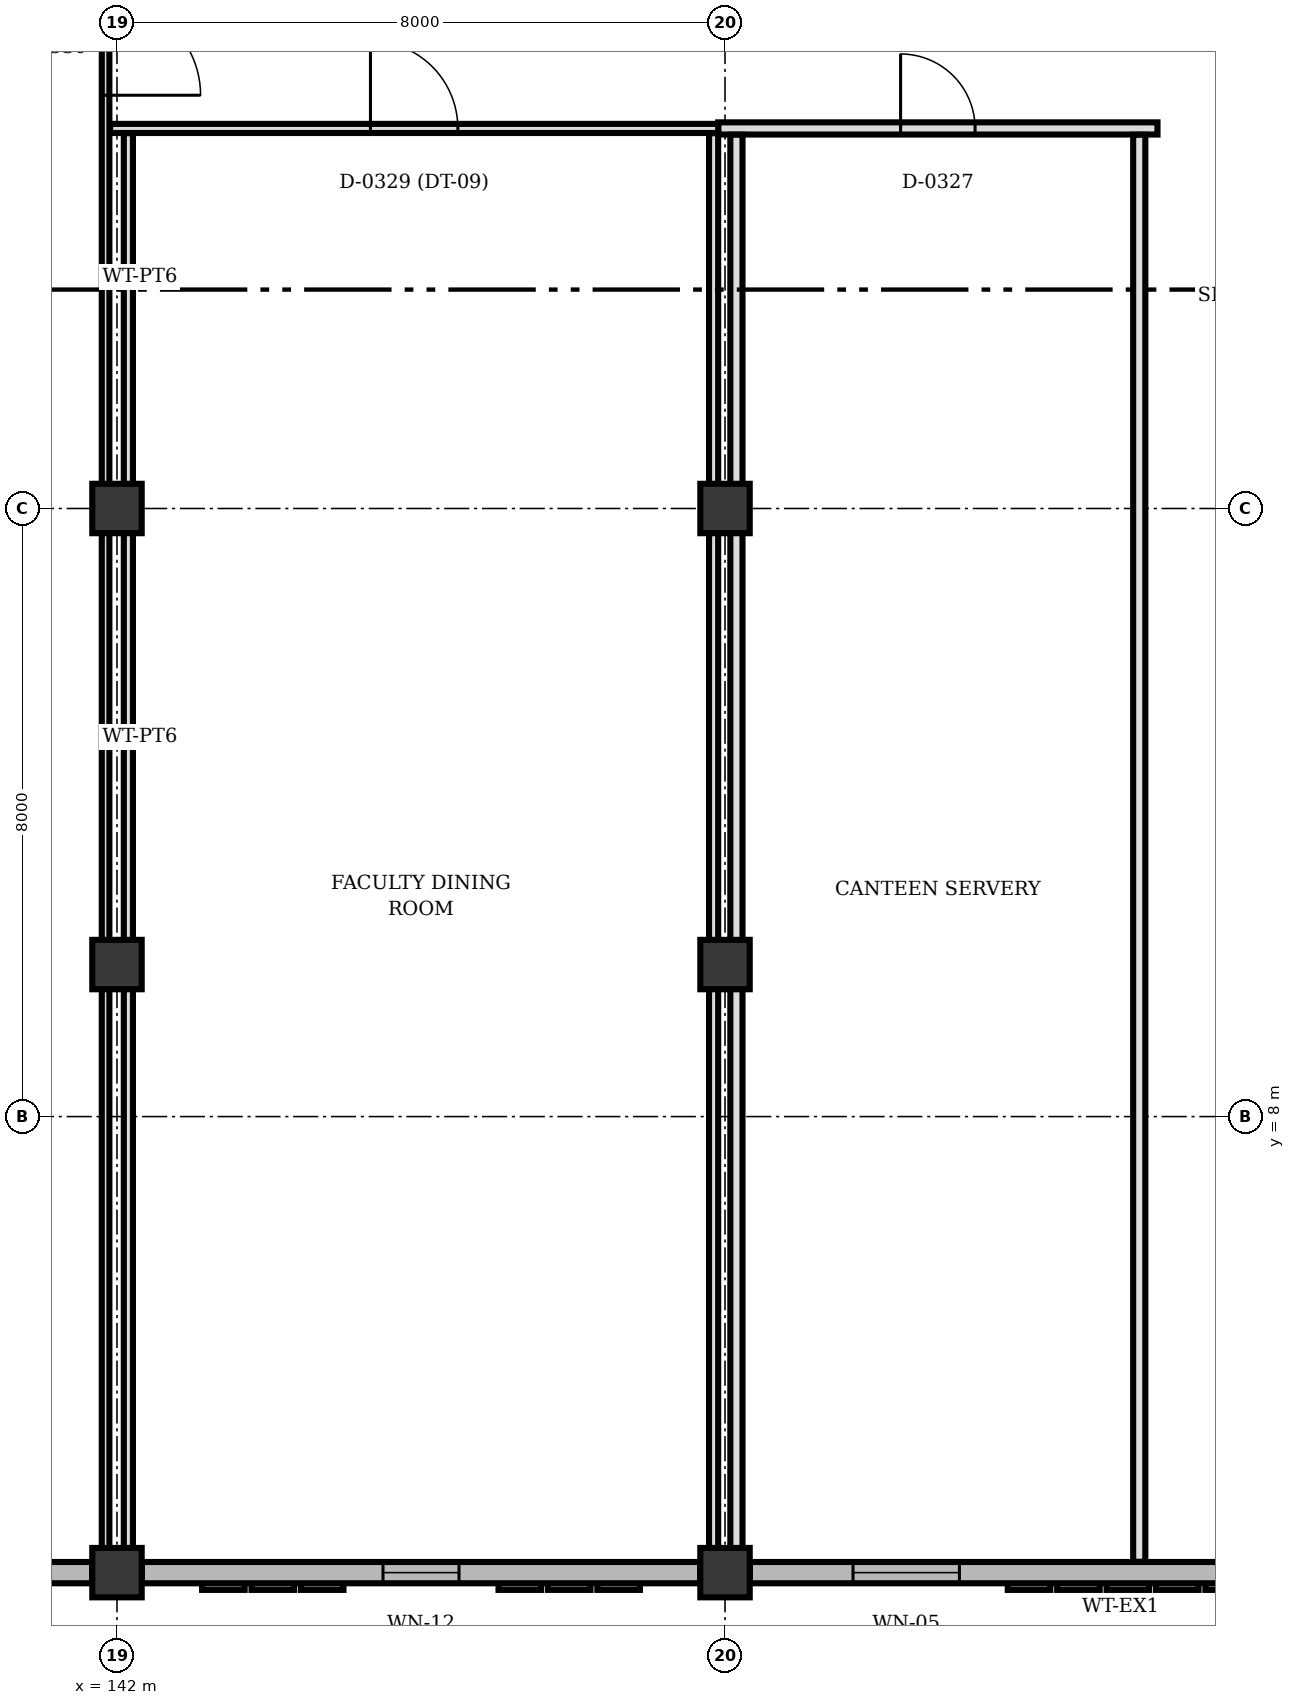
"""IFC4 building model, lengths in metres.
Left out: names, types, materials, properties, quantities, classifications, styles, units other than length and angle.
Written with IfcOpenShell. Run it as: python <this file> out.ifc"""

import sys

from ifc_helpers import new_model, si_unit, direction, frame, frame_2d, origin, origin_2d, place, context, subcontext, project, spatial, rectangle, extrude, element, fill, save


model = new_model("IFC4")
c1 = context("Model", 3, precision=1e-05, world=origin(), true_north=direction((0.0, 1.0)))
c2 = subcontext(c1, "Body", "Model", "MODEL_VIEW")
j1 = project(units=[si_unit("LENGTHUNIT", "METRE"), si_unit("PLANEANGLEUNIT", "RADIAN")], contexts=[c1])
p1 = place(None, origin())
s1 = spatial("IfcSite", under=j1, at=p1, CompositionType="ELEMENT")
p2 = place(p1, origin())
s2 = spatial("IfcBuilding", under=s1, at=p2, CompositionType="ELEMENT")
p3 = place(p2, origin())
s3 = spatial("IfcBuildingStorey", under=s2, at=p3, CompositionType="ELEMENT", Elevation=0.0)
for number, where, z_axis, x_axis in (
    (1, (142.0, 10.0, 0.0), (0.0, 0.0, 1.0), (1.0, 0.0, 0.0)),
    (2, (142.0, 16.0, 0.0), (0.0, 0.0, 1.0), (1.0, 0.0, 0.0)),
    (3, (142.0, 2.0, 0.0), (0.0, 0.0, 1.0), (1.0, 0.0, 0.0)),
    (4, (150.0, 10.0, 0.0), (0.0, 0.0, 1.0), (1.0, 0.0, 0.0)),
    (5, (150.0, 16.0, 0.0), (0.0, 0.0, 1.0), (1.0, 0.0, 0.0)),
    (6, (150.0, 2.0, 0.0), (0.0, 0.0, 1.0), (1.0, 0.0, 0.0)),
):
    element("IfcColumn", number, at=place(p3, frame(where, z_axis=z_axis, x_axis=x_axis)), inside=s3, PredefinedType="COLUMN", context=c2, shape_type="SweptSolid", body=[
        extrude(rectangle(XDim=0.65, YDim=0.65, at=origin_2d()), origin(), (0.0, 0.0, 1.0), 4.5),
    ])
p4 = place(p3, frame((157.673, 2.0, 0.0), z_axis=(0.0, 0.0, 1.0), x_axis=(-1.0, 0.0, 0.0)))
e7 = element("IfcWall", 7, at=p4, inside=s3, PredefinedType="SOLIDWALL", context=c2, shape_type="SweptSolid", body=[
    extrude(rectangle(XDim=7.346, YDim=0.28, at=frame_2d((3.673, 0.0))), origin(), (0.0, 0.0, 1.0), 3.55),
])
p5 = place(p4, frame((4.589, 0.0, 0.9)))
e8 = element("IfcOpeningElement", 8, at=p5, cuts=e7, PredefinedType="OPENING", context=c2, shape_type="SweptSolid", body=[
    extrude(rectangle(XDim=1.4, YDim=1.1, at=frame_2d((0.7, 0.55))), frame((0.0, 0.15, 0.0), z_axis=(0.0, -1.0, 0.0), x_axis=(1.0, 0.0, 0.0)), (0.0, 0.0, 1.0), 0.3),
])
p6 = place(p3, frame((149.673, 2.0, 0.0), z_axis=(0.0, 0.0, 1.0), x_axis=(-1.0, 0.0, 0.0)))
e9 = element("IfcWall", 9, at=p6, inside=s3, PredefinedType="SOLIDWALL", context=c2, shape_type="SweptSolid", body=[
    extrude(rectangle(XDim=7.346, YDim=0.28, at=frame_2d((3.673, 0.0))), origin(), (0.0, 0.0, 1.0), 3.55),
])
p7 = place(p6, frame((3.173, 0.0, 0.9)))
e10 = element("IfcOpeningElement", 10, at=p7, cuts=e9, PredefinedType="OPENING", context=c2, shape_type="SweptSolid", body=[
    extrude(rectangle(XDim=1.0, YDim=1.25, at=frame_2d((0.5, 0.625))), frame((0.0, 0.15, 0.0), z_axis=(0.0, -1.0, 0.0), x_axis=(1.0, 0.0, 0.0)), (0.0, 0.0, 1.0), 0.3),
])
p8 = place(p3, frame((141.673, 2.0, 0.0), z_axis=(0.0, 0.0, 1.0), x_axis=(-1.0, 0.0, 0.0)))
e11 = element("IfcWall", 11, at=p8, inside=s3, PredefinedType="SOLIDWALL", context=c2, shape_type="SweptSolid", body=[
    extrude(rectangle(XDim=7.346, YDim=0.28, at=frame_2d((3.673, 0.0))), origin(), (0.0, 0.0, 1.0), 3.55),
])
p9 = place(p8, frame((3.098, 0.0, 0.9)))
e12 = element("IfcOpeningElement", 12, at=p9, cuts=e11, PredefinedType="OPENING", context=c2, shape_type="SweptSolid", body=[
    extrude(rectangle(XDim=1.15, YDim=1.25, at=frame_2d((0.575, 0.625))), frame((0.0, 0.15, 0.0), z_axis=(0.0, -1.0, 0.0), x_axis=(1.0, 0.0, 0.0)), (0.0, 0.0, 1.0), 0.3),
])
p10 = place(p3, frame((149.91, 21.0, 0.0), z_axis=(0.0, 0.0, 1.0), x_axis=(1.0, 0.0, 0.0)))
e13 = element("IfcWall", 13, at=p10, inside=s3, PredefinedType="PARTITIONING", context=c2, shape_type="SweptSolid", body=[
    extrude(rectangle(XDim=5.78, YDim=0.16, at=frame_2d((2.89, 0.0))), origin(), (0.0, 0.0, 1.0), 3.572),
])
p11 = place(p10, frame((2.4, 0.0, 0.0)))
e14 = element("IfcOpeningElement", 14, at=p11, cuts=e13, PredefinedType="OPENING", context=c2, shape_type="SweptSolid", body=[
    extrude(rectangle(XDim=0.98, YDim=2.2, at=frame_2d((0.49, 1.1))), frame((0.0, 0.09, 0.0), z_axis=(0.0, -1.0, 0.0), x_axis=(1.0, 0.0, 0.0)), (0.0, 0.0, 1.0), 0.18),
])
p12 = place(p3, frame((155.45, 20.917, 0.0), z_axis=(0.0, 0.0, 1.0), x_axis=(0.0, -1.0, 0.0)))
e15 = element("IfcWall", 15, at=p12, inside=s3, PredefinedType="PARTITIONING", context=c2, shape_type="SweptSolid", body=[
    extrude(rectangle(XDim=18.774, YDim=0.16, at=frame_2d((9.387, 0.0))), origin(), (0.0, 0.0, 1.0), 3.572),
])
p13 = place(p3, frame((150.15, 2.317, 0.0), z_axis=(0.0, 0.0, 1.0), x_axis=(0.0, 1.0, 0.0)))
e16 = element("IfcWall", 16, at=p13, inside=s3, PredefinedType="PARTITIONING", context=c2, shape_type="SweptSolid", body=[
    extrude(rectangle(XDim=7.366, YDim=0.16, at=frame_2d((3.683, 0.0))), origin(), (0.0, 0.0, 1.0), 3.572),
])
p14 = place(p3, frame((150.15, 10.317, 0.0), z_axis=(0.0, 0.0, 1.0), x_axis=(0.0, 1.0, 0.0)))
e17 = element("IfcWall", 17, at=p14, inside=s3, PredefinedType="PARTITIONING", context=c2, shape_type="SweptSolid", body=[
    extrude(rectangle(XDim=5.366, YDim=0.16, at=frame_2d((2.683, 0.0))), origin(), (0.0, 0.0, 1.0), 3.572),
])
p15 = place(p3, frame((150.15, 16.317, 0.0), z_axis=(0.0, 0.0, 1.0), x_axis=(0.0, 1.0, 0.0)))
e18 = element("IfcWall", 18, at=p15, inside=s3, PredefinedType="PARTITIONING", context=c2, shape_type="SweptSolid", body=[
    extrude(rectangle(XDim=4.6, YDim=0.16, at=frame_2d((2.3, 0.0))), origin(), (0.0, 0.0, 1.0), 3.572),
])
p16 = place(p3, frame((141.91, 21.0, 0.0), z_axis=(0.0, 0.0, 1.0), x_axis=(1.0, 0.0, 0.0)))
e19 = element("IfcWall", 19, at=p16, inside=s3, PredefinedType="PARTITIONING", context=c2, shape_type="SweptSolid", body=[
    extrude(rectangle(XDim=8.0, YDim=0.12, at=frame_2d((4.0, 0.0))), origin(), (0.0, 0.0, 1.0), 3.572),
])
p17 = place(p16, frame((3.425, 0.0, 0.0)))
e20 = element("IfcOpeningElement", 20, at=p17, cuts=e19, PredefinedType="OPENING", context=c2, shape_type="SweptSolid", body=[
    extrude(rectangle(XDim=1.15, YDim=2.2, at=frame_2d((0.575, 1.1))), frame((0.0, 0.07, 0.0), z_axis=(0.0, -1.0, 0.0), x_axis=(1.0, 0.0, 0.0)), (0.0, 0.0, 1.0), 0.14),
])
p18 = place(p3, frame((149.85, 20.937, 0.0), z_axis=(0.0, 0.0, 1.0), x_axis=(0.0, -1.0, 0.0)))
e21 = element("IfcWall", 21, at=p18, inside=s3, PredefinedType="PARTITIONING", context=c2, shape_type="SweptSolid", body=[
    extrude(rectangle(XDim=4.62, YDim=0.12, at=frame_2d((2.31, 0.0))), origin(), (0.0, 0.0, 1.0), 3.572),
])
p19 = place(p3, frame((149.85, 15.683, 0.0), z_axis=(0.0, 0.0, 1.0), x_axis=(0.0, -1.0, 0.0)))
e22 = element("IfcWall", 22, at=p19, inside=s3, PredefinedType="PARTITIONING", context=c2, shape_type="SweptSolid", body=[
    extrude(rectangle(XDim=5.366, YDim=0.12, at=frame_2d((2.683, 0.0))), origin(), (0.0, 0.0, 1.0), 3.572),
])
for number, where, z_axis, x_axis in (
    (23, (149.85, 9.683, 0.0), (0.0, 0.0, 1.0), (0.0, -1.0, 0.0)),
    (24, (142.15, 2.317, 0.0), (0.0, 0.0, 1.0), (0.0, 1.0, 0.0)),
):
    element("IfcWall", number, at=place(p3, frame(where, z_axis=z_axis, x_axis=x_axis)), inside=s3, PredefinedType="PARTITIONING", context=c2, shape_type="SweptSolid", body=[
        extrude(rectangle(XDim=7.366, YDim=0.12, at=frame_2d((3.683, 0.0))), origin(), (0.0, 0.0, 1.0), 3.572),
    ])
p20 = place(p3, frame((142.15, 10.317, 0.0), z_axis=(0.0, 0.0, 1.0), x_axis=(0.0, 1.0, 0.0)))
e25 = element("IfcWall", 25, at=p20, inside=s3, PredefinedType="PARTITIONING", context=c2, shape_type="SweptSolid", body=[
    extrude(rectangle(XDim=5.366, YDim=0.12, at=frame_2d((2.683, 0.0))), origin(), (0.0, 0.0, 1.0), 3.572),
])
p21 = place(p3, frame((142.15, 16.317, 0.0), z_axis=(0.0, 0.0, 1.0), x_axis=(0.0, 1.0, 0.0)))
e26 = element("IfcWall", 26, at=p21, inside=s3, PredefinedType="PARTITIONING", context=c2, shape_type="SweptSolid", body=[
    extrude(rectangle(XDim=4.62, YDim=0.12, at=frame_2d((2.31, 0.0))), origin(), (0.0, 0.0, 1.0), 3.572),
])
p22 = place(p3, frame((141.85, 23.683, 0.0), z_axis=(0.0, 0.0, 1.0), x_axis=(0.0, -1.0, 0.0)))
e27 = element("IfcWall", 27, at=p22, inside=s3, PredefinedType="PARTITIONING", context=c2, shape_type="SweptSolid", body=[
    extrude(rectangle(XDim=7.366, YDim=0.1, at=frame_2d((3.683, 0.0))), origin(), (0.0, 0.0, 1.0), 3.572),
])
p23 = place(p22, frame((0.996, 0.0, 0.0)))
e28 = element("IfcOpeningElement", 28, at=p23, cuts=e27, PredefinedType="OPENING", context=c2, shape_type="SweptSolid", body=[
    extrude(rectangle(XDim=1.25, YDim=2.2, at=frame_2d((0.625, 1.1))), frame((0.0, 0.06, 0.0), z_axis=(0.0, -1.0, 0.0), x_axis=(1.0, 0.0, 0.0)), (0.0, 0.0, 1.0), 0.12),
])
p24 = place(p3, frame((141.85, 15.683, 0.0), z_axis=(0.0, 0.0, 1.0), x_axis=(0.0, -1.0, 0.0)))
e29 = element("IfcWall", 29, at=p24, inside=s3, PredefinedType="PARTITIONING", context=c2, shape_type="SweptSolid", body=[
    extrude(rectangle(XDim=5.366, YDim=0.1, at=frame_2d((2.683, 0.0))), origin(), (0.0, 0.0, 1.0), 3.572),
])
p25 = place(p3, frame((141.85, 9.683, 0.0), z_axis=(0.0, 0.0, 1.0), x_axis=(0.0, -1.0, 0.0)))
e30 = element("IfcWall", 30, at=p25, inside=s3, PredefinedType="PARTITIONING", context=c2, shape_type="SweptSolid", body=[
    extrude(rectangle(XDim=7.366, YDim=0.1, at=frame_2d((3.683, 0.0))), origin(), (0.0, 0.0, 1.0), 3.572),
])
p26 = place(p5, origin())
e31 = element("IfcWindow", 31, at=p26, inside=s3, PartitioningType="SINGLE_PANEL", PredefinedType="WINDOW", context=c2, shape_type="SweptSolid", body=[
    extrude(rectangle(XDim=1.4, YDim=1.1, at=frame_2d((0.7, 0.55))), frame((0.0, 0.03, 0.0), z_axis=(0.0, -1.0, 0.0), x_axis=(1.0, 0.0, 0.0)), (0.0, 0.0, 1.0), 0.06),
])
fill(e8, e31)
p27 = place(p7, origin())
e32 = element("IfcWindow", 32, at=p27, inside=s3, PartitioningType="SINGLE_PANEL", PredefinedType="WINDOW", context=c2, shape_type="SweptSolid", body=[
    extrude(rectangle(XDim=1.0, YDim=1.25, at=frame_2d((0.5, 0.625))), frame((0.0, 0.03, 0.0), z_axis=(0.0, -1.0, 0.0), x_axis=(1.0, 0.0, 0.0)), (0.0, 0.0, 1.0), 0.06),
])
fill(e10, e32)
p28 = place(p11, origin())
e33 = element("IfcDoor", 33, at=p28, inside=s3, OperationType="SINGLE_SWING_LEFT", PredefinedType="DOOR", context=c2, shape_type="SweptSolid", body=[
    extrude(rectangle(XDim=0.98, YDim=2.2, at=frame_2d((0.49, 1.1))), frame((0.0, 0.025, 0.0), z_axis=(0.0, -1.0, 0.0), x_axis=(1.0, 0.0, 0.0)), (0.0, 0.0, 1.0), 0.05),
])
fill(e14, e33)
p29 = place(p17, origin())
e34 = element("IfcDoor", 34, at=p29, inside=s3, OperationType="SINGLE_SWING_LEFT", PredefinedType="DOOR", context=c2, shape_type="SweptSolid", body=[
    extrude(rectangle(XDim=1.15, YDim=2.2, at=frame_2d((0.575, 1.1))), frame((0.0, 0.025, 0.0), z_axis=(0.0, -1.0, 0.0), x_axis=(1.0, 0.0, 0.0)), (0.0, 0.0, 1.0), 0.05),
])
fill(e20, e34)
p30 = place(p23, origin())
e35 = element("IfcDoor", 35, at=p30, inside=s3, OperationType="SINGLE_SWING_RIGHT", PredefinedType="DOOR", context=c2, shape_type="SweptSolid", body=[
    extrude(rectangle(XDim=1.25, YDim=2.2, at=frame_2d((0.625, 1.1))), frame((0.0, 0.025, 0.0), z_axis=(0.0, -1.0, 0.0), x_axis=(1.0, 0.0, 0.0)), (0.0, 0.0, 1.0), 0.05),
])
fill(e28, e35)
save(model, sys.argv[1])
